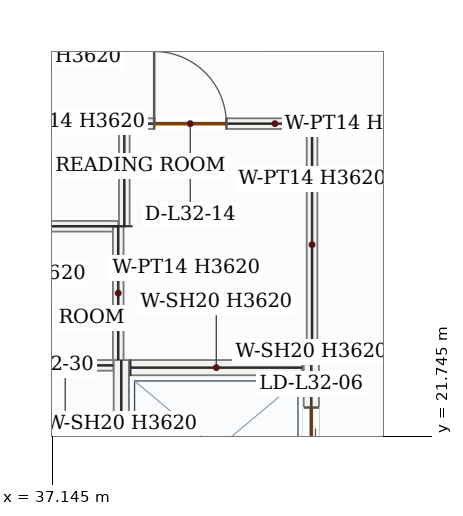
"""IFC4 building model, lengths in metres.
Left out: names, types, materials, properties, quantities, classifications, styles, units other than length and angle.
Written with IfcOpenShell. Run it as: python <this file> out.ifc"""

import sys

from ifc_helpers import new_model, si_unit, direction, frame, frame_2d, origin, place, context, subcontext, project, spatial, rectangle, extrude, source, transform, mapped, element, fill, save


model = new_model("IFC4")
c1 = context("Model", 3, precision=1e-05, world=origin(), true_north=direction((0.0, 1.0)))
c2 = subcontext(c1, "Body", "Model", "MODEL_VIEW")
j1 = project(units=[si_unit("LENGTHUNIT", "METRE"), si_unit("PLANEANGLEUNIT", "RADIAN")], contexts=[c1])
p1 = place(None, origin())
s1 = spatial("IfcSite", under=j1, at=p1, CompositionType="ELEMENT")
p2 = place(p1, origin())
s2 = spatial("IfcBuilding", under=s1, at=p2, CompositionType="ELEMENT")
p3 = place(p2, frame((0.0, 0.0, 143.4)))
s3 = spatial("IfcBuildingStorey", under=s2, at=p3, CompositionType="ELEMENT", Elevation=143.4)
m1 = source(origin(), c2, "Body", "SweptSolid", [
    extrude(rectangle(XDim=2.35, YDim=0.2, at=frame_2d((1.175, 0.0))), origin(), (0.0, 0.0, 1.0), 3.62),
])
p4 = place(p3, frame((38.05, 20.4, 0.0), z_axis=(0.0, 0.0, 1.0), x_axis=(0.0, 1.0, 0.0)))
e1 = element("IfcWall", 1, at=p4, inside=s3, PredefinedType="SOLIDWALL", context=c2, shape_type="MappedRepresentation", body=[
    mapped(m1, transform((0.0, 0.0, 0.0), x_axis=(1.0, 0.0, 0.0), y_axis=(0.0, 1.0, 0.0), z_axis=(0.0, 0.0, 1.0), scale=1.0)),
])
p5 = place(p3, frame((40.55, 20.4, 0.0), z_axis=(0.0, 0.0, 1.0), x_axis=(0.0, 1.0, 0.0)))
e2 = element("IfcWall", 2, at=p5, inside=s3, PredefinedType="SOLIDWALL", context=c2, shape_type="SweptSolid", body=[
    extrude(rectangle(XDim=2.35, YDim=0.2, at=frame_2d((1.175, 0.0))), origin(), (0.0, 0.0, 1.0), 3.62),
])
p6 = place(p5, frame((0.625, 0.0, 0.0)))
e3 = element("IfcOpeningElement", 3, at=p6, cuts=e2, PredefinedType="OPENING", context=c2, shape_type="SweptSolid", body=[
    extrude(rectangle(XDim=1.1, YDim=2.15, at=frame_2d((0.55, 1.075))), frame((0.0, 0.11, 0.0), z_axis=(0.0, -1.0, 0.0), x_axis=(1.0, 0.0, 0.0)), (0.0, 0.0, 1.0), 0.22),
])
m2 = source(origin(), c2, "Body", "SweptSolid", [
    extrude(rectangle(XDim=2.26, YDim=0.2, at=frame_2d((1.13, 0.0))), origin(), (0.0, 0.0, 1.0), 3.62),
])
p7 = place(p3, frame((38.17, 22.65, 0.0), z_axis=(0.0, 0.0, 1.0), x_axis=(1.0, 0.0, 0.0)))
e4 = element("IfcWall", 4, at=p7, inside=s3, PredefinedType="SOLIDWALL", context=c2, shape_type="MappedRepresentation", body=[
    mapped(m2, transform((0.0, 0.0, 0.0), x_axis=(1.0, 0.0, 0.0), y_axis=(0.0, 1.0, 0.0), z_axis=(0.0, 0.0, 1.0), scale=1.0)),
])
m3 = source(origin(), c2, "Body", "SweptSolid", [
    extrude(rectangle(XDim=1.265, YDim=0.14, at=frame_2d((0.633, 0.0))), origin(), (0.0, 0.0, 1.0), 3.62),
])
p8 = place(p3, frame((36.68, 22.68, 0.0), z_axis=(0.0, 0.0, 1.0), x_axis=(1.0, 0.0, 0.0)))
e5 = element("IfcWall", 5, at=p8, inside=s3, PredefinedType="PARTITIONING", context=c2, shape_type="MappedRepresentation", body=[
    mapped(m3, transform((0.0, 0.0, 0.0), x_axis=(1.0, 0.0, 0.0), y_axis=(0.0, 1.0, 0.0), z_axis=(0.0, 0.0, 1.0), scale=1.0)),
])
m4 = source(origin(), c2, "Body", "SweptSolid", [
    extrude(rectangle(XDim=3.945, YDim=0.14, at=frame_2d((1.973, 0.0))), origin(), (0.0, 0.0, 1.0), 3.62),
])
p9 = place(p3, frame((34.065, 24.51, 0.0), z_axis=(0.0, 0.0, 1.0), x_axis=(1.0, 0.0, 0.0)))
e6 = element("IfcWall", 6, at=p9, inside=s3, PredefinedType="PARTITIONING", context=c2, shape_type="MappedRepresentation", body=[
    mapped(m4, transform((0.0, 0.0, 0.0), x_axis=(1.0, 0.0, 0.0), y_axis=(0.0, 1.0, 0.0), z_axis=(0.0, 0.0, 1.0), scale=1.0)),
])
m5 = source(origin(), c2, "Body", "SweptSolid", [
    extrude(rectangle(XDim=1.76, YDim=0.14, at=frame_2d((0.88, 0.0))), origin(), (0.0, 0.0, 1.0), 3.62),
])
p10 = place(p3, frame((38.01, 24.51, 0.0), z_axis=(0.0, 0.0, 1.0), x_axis=(0.0, -1.0, 0.0)))
e7 = element("IfcWall", 7, at=p10, inside=s3, PredefinedType="PARTITIONING", context=c2, shape_type="MappedRepresentation", body=[
    mapped(m5, transform((0.0, 0.0, 0.0), x_axis=(1.0, 0.0, 0.0), y_axis=(0.0, 1.0, 0.0), z_axis=(0.0, 0.0, 1.0), scale=1.0)),
])
m6 = source(origin(), c2, "Body", "SweptSolid", [
    extrude(rectangle(XDim=1.35, YDim=0.14, at=frame_2d((0.675, 0.0))), origin(), (0.0, 0.0, 1.0), 3.62),
])
p11 = place(p3, frame((38.09, 24.51, 0.0), z_axis=(0.0, 0.0, 1.0), x_axis=(0.0, 1.0, 0.0)))
e8 = element("IfcWall", 8, at=p11, inside=s3, PredefinedType="PARTITIONING", context=c2, shape_type="MappedRepresentation", body=[
    mapped(m6, transform((0.0, 0.0, 0.0), x_axis=(1.0, 0.0, 0.0), y_axis=(0.0, 1.0, 0.0), z_axis=(0.0, 0.0, 1.0), scale=1.0)),
])
p12 = place(p3, frame((38.165, 25.86, 0.0), z_axis=(0.0, 0.0, 1.0), x_axis=(1.0, 0.0, 0.0)))
e9 = element("IfcWall", 9, at=p12, inside=s3, PredefinedType="PARTITIONING", context=c2, shape_type="SweptSolid", body=[
    extrude(rectangle(XDim=2.395, YDim=0.14, at=frame_2d((1.198, 0.0))), origin(), (0.0, 0.0, 1.0), 3.62),
])
p13 = place(p12, frame((0.318, 0.0, 0.0)))
e10 = element("IfcOpeningElement", 10, at=p13, cuts=e9, PredefinedType="OPENING", context=c2, shape_type="SweptSolid", body=[
    extrude(rectangle(XDim=0.95, YDim=2.15, at=frame_2d((0.475, 1.075))), frame((0.0, 0.08, 0.0), z_axis=(0.0, -1.0, 0.0), x_axis=(1.0, 0.0, 0.0)), (0.0, 0.0, 1.0), 0.16),
])
m7 = source(origin(), c2, "Body", "SweptSolid", [
    extrude(rectangle(XDim=3.035, YDim=0.14, at=frame_2d((1.518, 0.0))), origin(), (0.0, 0.0, 1.0), 3.62),
])
p14 = place(p3, frame((40.56, 25.785, 0.0), z_axis=(0.0, 0.0, 1.0), x_axis=(0.0, -1.0, 0.0)))
e11 = element("IfcWall", 11, at=p14, inside=s3, PredefinedType="PARTITIONING", context=c2, shape_type="MappedRepresentation", body=[
    mapped(m7, transform((0.0, 0.0, 0.0), x_axis=(1.0, 0.0, 0.0), y_axis=(0.0, 1.0, 0.0), z_axis=(0.0, 0.0, 1.0), scale=1.0)),
])
m8 = source(origin(), c2, "Body", "SweptSolid", [
    extrude(rectangle(XDim=1.1, YDim=2.15, at=frame_2d((0.55, 1.075))), frame((0.0, 0.025, 0.0), z_axis=(0.0, -1.0, 0.0), x_axis=(1.0, 0.0, 0.0)), (0.0, 0.0, 1.0), 0.05),
])
p15 = place(p6, origin())
e12 = element("IfcDoor", 12, at=p15, inside=s3, OperationType="DOUBLE_DOOR_SLIDING", PredefinedType="DOOR", context=c2, shape_type="MappedRepresentation", body=[
    mapped(m8, transform((0.0, 0.0, 0.0), x_axis=(1.0, 0.0, 0.0), y_axis=(0.0, 1.0, 0.0), z_axis=(0.0, 0.0, 1.0), scale=1.0)),
])
fill(e3, e12)
m9 = source(origin(), c2, "Body", "SweptSolid", [
    extrude(rectangle(XDim=0.95, YDim=2.15, at=frame_2d((0.475, 1.075))), frame((0.0, 0.025, 0.0), z_axis=(0.0, -1.0, 0.0), x_axis=(1.0, 0.0, 0.0)), (0.0, 0.0, 1.0), 0.05),
])
p16 = place(p13, origin())
e13 = element("IfcDoor", 13, at=p16, inside=s3, OperationType="SINGLE_SWING_LEFT", PredefinedType="DOOR", context=c2, shape_type="MappedRepresentation", body=[
    mapped(m9, transform((0.0, 0.0, 0.0), x_axis=(1.0, 0.0, 0.0), y_axis=(0.0, 1.0, 0.0), z_axis=(0.0, 0.0, 1.0), scale=1.0)),
])
fill(e10, e13)
save(model, sys.argv[1])
